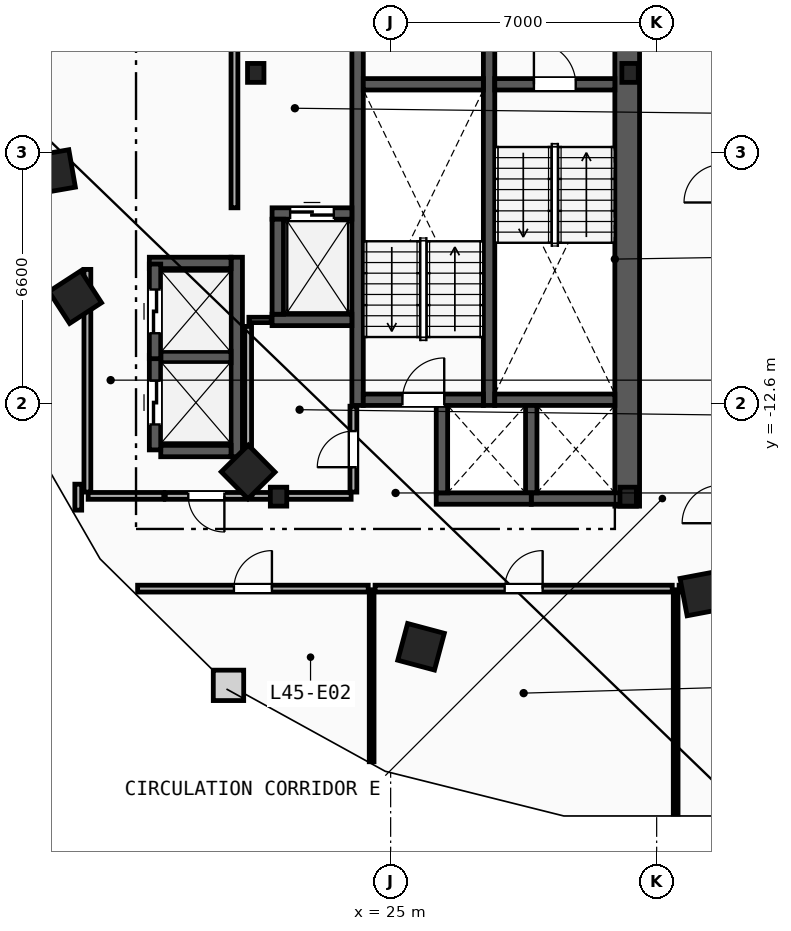
"""IFC4 building model, lengths in metres.
Left out: names, types, materials, properties, quantities, classifications, styles, units other than length and angle.
Written with IfcOpenShell. Run it as: python <this file> out.ifc"""

import sys

from ifc_helpers import new_model, si_unit, direction, frame, frame_2d, origin, origin_2d, place, context, subcontext, project, spatial, rectangle, i_section, extrude, element, fill, save


model = new_model("IFC4")
c1 = context("Model", 3, precision=1e-05, world=origin(), true_north=direction((0.0, 1.0)))
c2 = subcontext(c1, "Body", "Model", "MODEL_VIEW")
j1 = project(units=[si_unit("LENGTHUNIT", "METRE"), si_unit("PLANEANGLEUNIT", "RADIAN")], contexts=[c1])
p1 = place(None, origin())
s1 = spatial("IfcSite", under=j1, at=p1, CompositionType="ELEMENT")
p2 = place(p1, origin())
s2 = spatial("IfcBuilding", under=s1, at=p2, CompositionType="ELEMENT")
p3 = place(p2, frame((0.0, 0.0, 172.8)))
s3 = spatial("IfcBuildingStorey", under=s2, at=p3, CompositionType="ELEMENT", Elevation=172.8)
for number, where, z_axis, x_axis in (
    (1, (31.3, -3.9, 0.0), (0.0, 0.0, 1.0), (1.0, 0.0, 0.0)),
    (2, (21.45, -3.9, 0.0), (0.0, 0.0, 1.0), (1.0, 0.0, 0.0)),
    (3, (22.05, -15.05, 0.0), (0.0, 0.0, 1.0), (1.0, 0.0, 0.0)),
    (4, (31.25, -15.05, 0.0), (0.0, 0.0, 1.0), (1.0, 0.0, 0.0)),
):
    element("IfcColumn", number, at=place(p3, frame(where, z_axis=z_axis, x_axis=x_axis)), inside=s3, PredefinedType="COLUMN", context=c2, shape_type="SweptSolid", body=[
        extrude(i_section(OverallWidth=0.432, OverallDepth=0.498, WebThickness=0.056, FlangeThickness=0.089, FilletRadius=0.018, at=origin_2d()), origin(), (0.0, 0.0, 1.0), 3.6),
    ])
for number, where, z_axis, x_axis in (
    (5, (15.55, -3.2, 0.0), (0.0, 0.0, 1.0), (-0.315, -0.949, 0.0)),
    (6, (16.125, -6.5, 0.0), (0.0, 0.0, 1.0), (0.172, -0.985, 0.0)),
    (7, (16.7, -9.8, 0.0), (0.0, 0.0, 1.0), (0.544, -0.839, 0.0)),
    (8, (21.25, -14.4, 0.0), (0.0, 0.0, 1.0), (0.703, -0.711, 0.0)),
    (9, (25.8, -19.0, 0.0), (0.0, 0.0, 1.0), (0.966, -0.259, 0.0)),
    (10, (33.2, -17.6, 0.0), (0.0, 0.0, 1.0), (0.983, 0.186, 0.0)),
):
    element("IfcColumn", number, at=place(p3, frame(where, z_axis=z_axis, x_axis=x_axis)), inside=s3, PredefinedType="COLUMN", context=c2, shape_type="SweptSolid", body=[
        extrude(rectangle(XDim=1.0, YDim=1.0, at=origin_2d()), origin(), (0.0, 0.0, 1.0), 3.6),
    ])
p4 = place(p3, frame((31.225, -15.3, 0.0), z_axis=(0.0, 0.0, 1.0), x_axis=(0.0, 1.0, 0.0)))
e11 = element("IfcWall", 11, at=p4, inside=s3, PredefinedType="SHEAR", context=c2, shape_type="SweptSolid", body=[
    extrude(rectangle(XDim=13.33, YDim=0.65, at=frame_2d((6.665, 0.0))), origin(), (0.0, 0.0, 1.0), 3.36),
])
for number, where, z_axis, x_axis in (
    (12, (27.59, -12.65, 0.0), (0.0, 0.0, 1.0), (0.0, 1.0, 0.0)),
    (13, (24.13, -12.65, 0.0), (0.0, 0.0, 1.0), (0.0, 1.0, 0.0)),
):
    element("IfcWall", number, at=place(p3, frame(where, z_axis=z_axis, x_axis=x_axis)), inside=s3, PredefinedType="SHEAR", context=c2, shape_type="SweptSolid", body=[
        extrude(rectangle(XDim=10.68, YDim=0.3, at=frame_2d((5.34, 0.0))), origin(), (0.0, 0.0, 1.0), 3.36),
    ])
p5 = place(p3, frame((27.74, -4.2, 0.0), z_axis=(0.0, 0.0, 1.0), x_axis=(1.0, 0.0, 0.0)))
e14 = element("IfcWall", 14, at=p5, inside=s3, PredefinedType="SHEAR", context=c2, shape_type="SweptSolid", body=[
    extrude(rectangle(XDim=3.16, YDim=0.3, at=frame_2d((1.58, 0.0))), origin(), (0.0, 0.0, 1.0), 3.36),
])
p6 = place(p5, frame((1.03, 0.0, 0.0)))
e15 = element("IfcOpeningElement", 15, at=p6, cuts=e14, PredefinedType="OPENING", context=c2, shape_type="SweptSolid", body=[
    extrude(rectangle(XDim=1.1, YDim=2.15, at=frame_2d((0.55, 1.075))), frame((0.0, 0.16, 0.0), z_axis=(0.0, -1.0, 0.0), x_axis=(1.0, 0.0, 0.0)), (0.0, 0.0, 1.0), 0.32),
])
p7 = place(p3, frame((27.74, -12.5, 0.0), z_axis=(0.0, 0.0, 1.0), x_axis=(1.0, 0.0, 0.0)))
e16 = element("IfcWall", 16, at=p7, inside=s3, PredefinedType="SHEAR", context=c2, shape_type="SweptSolid", body=[
    extrude(rectangle(XDim=3.16, YDim=0.3, at=frame_2d((1.58, 0.0))), origin(), (0.0, 0.0, 1.0), 3.36),
])
p8 = place(p3, frame((24.28, -12.5, 0.0), z_axis=(0.0, 0.0, 1.0), x_axis=(1.0, 0.0, 0.0)))
e17 = element("IfcWall", 17, at=p8, inside=s3, PredefinedType="SHEAR", context=c2, shape_type="SweptSolid", body=[
    extrude(rectangle(XDim=3.16, YDim=0.3, at=frame_2d((1.58, 0.0))), origin(), (0.0, 0.0, 1.0), 3.36),
])
p9 = place(p8, frame((1.03, 0.0, 0.0)))
e18 = element("IfcOpeningElement", 18, at=p9, cuts=e17, PredefinedType="OPENING", context=c2, shape_type="SweptSolid", body=[
    extrude(rectangle(XDim=1.1, YDim=2.15, at=frame_2d((0.55, 1.075))), frame((0.0, 0.16, 0.0), z_axis=(0.0, -1.0, 0.0), x_axis=(1.0, 0.0, 0.0)), (0.0, 0.0, 1.0), 0.32),
])
p10 = place(p3, frame((24.28, -4.2, 0.0), z_axis=(0.0, 0.0, 1.0), x_axis=(1.0, 0.0, 0.0)))
e19 = element("IfcWall", 19, at=p10, inside=s3, PredefinedType="SHEAR", context=c2, shape_type="SweptSolid", body=[
    extrude(rectangle(XDim=3.16, YDim=0.3, at=frame_2d((1.58, 0.0))), origin(), (0.0, 0.0, 1.0), 3.36),
])
p11 = place(p3, frame((20.89, -7.45, 0.0), z_axis=(0.0, 0.0, 1.0), x_axis=(0.0, 1.0, 0.0)))
e20 = element("IfcWall", 20, at=p11, inside=s3, PredefinedType="PARTITIONING", context=c2, shape_type="SweptSolid", body=[
    extrude(rectangle(XDim=5.3, YDim=0.18, at=frame_2d((2.65, 0.0))), origin(), (0.0, 0.0, 1.0), 3.36),
])
p12 = place(p3, frame((21.88, -7.6, 0.0), z_axis=(0.0, 0.0, 1.0), x_axis=(1.0, 0.0, 0.0)))
e21 = element("IfcWall", 21, at=p12, inside=s3, PredefinedType="SHEAR", context=c2, shape_type="SweptSolid", body=[
    extrude(rectangle(XDim=2.1, YDim=0.3, at=frame_2d((1.05, 0.0))), origin(), (0.0, 0.0, 1.0), 3.36),
])
p13 = place(p12, frame((0.475, 0.0, 0.0)))
e22 = element("IfcOpeningElement", 22, at=p13, cuts=e21, PredefinedType="OPENING", context=c2, shape_type="SweptSolid", body=[
    extrude(rectangle(XDim=1.15, YDim=2.2, at=frame_2d((0.575, 1.1))), frame((0.0, 0.16, 0.0), z_axis=(0.0, -1.0, 0.0), x_axis=(1.0, 0.0, 0.0)), (0.0, 0.0, 1.0), 0.32),
])
p14 = place(p3, frame((21.88, -10.4, 0.0), z_axis=(0.0, 0.0, 1.0), x_axis=(1.0, 0.0, 0.0)))
e23 = element("IfcWall", 23, at=p14, inside=s3, PredefinedType="SHEAR", context=c2, shape_type="SweptSolid", body=[
    extrude(rectangle(XDim=2.1, YDim=0.3, at=frame_2d((1.05, 0.0))), origin(), (0.0, 0.0, 1.0), 3.36),
])
for number, where, z_axis, x_axis in (
    (24, (22.03, -10.25, 0.0), (0.0, 0.0, 1.0), (0.0, 1.0, 0.0)),
    (25, (28.7, -15.1, 0.0), (0.0, 0.0, 1.0), (1.0, 0.0, 0.0)),
):
    element("IfcWall", number, at=place(p3, frame(where, z_axis=z_axis, x_axis=x_axis)), inside=s3, PredefinedType="SHEAR", context=c2, shape_type="SweptSolid", body=[
        extrude(rectangle(XDim=2.5, YDim=0.3, at=frame_2d((1.25, 0.0))), origin(), (0.0, 0.0, 1.0), 3.36),
    ])
p15 = place(p3, frame((28.7, -14.95, 0.0), z_axis=(0.0, 0.0, 1.0), x_axis=(0.0, 1.0, 0.0)))
e26 = element("IfcWall", 26, at=p15, inside=s3, PredefinedType="SHEAR", context=c2, shape_type="SweptSolid", body=[
    extrude(rectangle(XDim=2.3, YDim=0.3, at=frame_2d((1.15, 0.0))), origin(), (0.0, 0.0, 1.0), 3.36),
])
p16 = place(p3, frame((26.2, -15.1, 0.0), z_axis=(0.0, 0.0, 1.0), x_axis=(1.0, 0.0, 0.0)))
e27 = element("IfcWall", 27, at=p16, inside=s3, PredefinedType="SHEAR", context=c2, shape_type="SweptSolid", body=[
    extrude(rectangle(XDim=2.5, YDim=0.3, at=frame_2d((1.25, 0.0))), origin(), (0.0, 0.0, 1.0), 3.36),
])
p17 = place(p3, frame((26.35, -14.95, 0.0), z_axis=(0.0, 0.0, 1.0), x_axis=(0.0, 1.0, 0.0)))
e28 = element("IfcWall", 28, at=p17, inside=s3, PredefinedType="SHEAR", context=c2, shape_type="SweptSolid", body=[
    extrude(rectangle(XDim=2.3, YDim=0.3, at=frame_2d((1.15, 0.0))), origin(), (0.0, 0.0, 1.0), 3.36),
])
p18 = place(p3, frame((20.95, -14.0, 0.0), z_axis=(0.0, 0.0, 1.0), x_axis=(0.0, 1.0, 0.0)))
e29 = element("IfcWall", 29, at=p18, inside=s3, PredefinedType="SHEAR", context=c2, shape_type="SweptSolid", body=[
    extrude(rectangle(XDim=5.25, YDim=0.3, at=frame_2d((2.625, 0.0))), origin(), (0.0, 0.0, 1.0), 3.36),
])
p19 = place(p3, frame((18.95, -13.85, 0.0), z_axis=(0.0, 0.0, 1.0), x_axis=(1.0, 0.0, 0.0)))
e30 = element("IfcWall", 30, at=p19, inside=s3, PredefinedType="SHEAR", context=c2, shape_type="SweptSolid", body=[
    extrude(rectangle(XDim=1.85, YDim=0.3, at=frame_2d((0.925, 0.0))), origin(), (0.0, 0.0, 1.0), 3.36),
])
p20 = place(p3, frame((18.65, -8.9, 0.0), z_axis=(0.0, 0.0, 1.0), x_axis=(1.0, 0.0, 0.0)))
e31 = element("IfcWall", 31, at=p20, inside=s3, PredefinedType="SHEAR", context=c2, shape_type="SweptSolid", body=[
    extrude(rectangle(XDim=2.15, YDim=0.3, at=frame_2d((1.075, 0.0))), origin(), (0.0, 0.0, 1.0), 3.36),
])
p21 = place(p3, frame((18.95, -11.375, 0.0), z_axis=(0.0, 0.0, 1.0), x_axis=(1.0, 0.0, 0.0)))
e32 = element("IfcWall", 32, at=p21, inside=s3, PredefinedType="SHEAR", context=c2, shape_type="SweptSolid", body=[
    extrude(rectangle(XDim=1.85, YDim=0.3, at=frame_2d((0.925, 0.0))), origin(), (0.0, 0.0, 1.0), 3.36),
])
p22 = place(p3, frame((18.8, -13.82, 0.0), z_axis=(0.0, 0.0, 1.0), x_axis=(0.0, 1.0, 0.0)))
e33 = element("IfcWall", 33, at=p22, inside=s3, PredefinedType="SHEAR", context=c2, shape_type="SweptSolid", body=[
    extrude(rectangle(XDim=2.49, YDim=0.3, at=frame_2d((1.245, 0.0))), origin(), (0.0, 0.0, 1.0), 3.36),
])
p23 = place(p22, frame((0.67, 0.0, 0.0)))
e34 = element("IfcOpeningElement", 34, at=p23, cuts=e33, PredefinedType="OPENING", context=c2, shape_type="SweptSolid", body=[
    extrude(rectangle(XDim=1.15, YDim=2.2, at=frame_2d((0.575, 1.1))), frame((0.0, 0.16, 0.0), z_axis=(0.0, -1.0, 0.0), x_axis=(1.0, 0.0, 0.0)), (0.0, 0.0, 1.0), 0.32),
])
p24 = place(p3, frame((18.8, -11.42, 0.0), z_axis=(0.0, 0.0, 1.0), x_axis=(0.0, 1.0, 0.0)))
e35 = element("IfcWall", 35, at=p24, inside=s3, PredefinedType="SHEAR", context=c2, shape_type="SweptSolid", body=[
    extrude(rectangle(XDim=2.49, YDim=0.3, at=frame_2d((1.245, 0.0))), origin(), (0.0, 0.0, 1.0), 3.36),
])
p25 = place(p24, frame((0.67, 0.0, 0.0)))
e36 = element("IfcOpeningElement", 36, at=p25, cuts=e35, PredefinedType="OPENING", context=c2, shape_type="SweptSolid", body=[
    extrude(rectangle(XDim=1.15, YDim=2.2, at=frame_2d((0.575, 1.1))), frame((0.0, 0.16, 0.0), z_axis=(0.0, -1.0, 0.0), x_axis=(1.0, 0.0, 0.0)), (0.0, 0.0, 1.0), 0.32),
])
p26 = place(p3, frame((17.02, -14.93, 0.0), z_axis=(0.0, 0.0, 1.0), x_axis=(0.0, 1.0, 0.0)))
e37 = element("IfcWall", 37, at=p26, inside=s3, PredefinedType="PARTITIONING", context=c2, shape_type="SweptSolid", body=[
    extrude(rectangle(XDim=5.86, YDim=0.18, at=frame_2d((2.93, 0.0))), origin(), (0.0, 0.0, 1.0), 3.36),
])
p27 = place(p3, frame((17.04, -15.03, 0.0), z_axis=(0.0, 0.0, 1.0), x_axis=(1.0, 0.0, 0.0)))
e38 = element("IfcWall", 38, at=p27, inside=s3, PredefinedType="PARTITIONING", context=c2, shape_type="SweptSolid", body=[
    extrude(rectangle(XDim=1.99, YDim=0.18, at=frame_2d((0.995, 0.0))), origin(), (0.0, 0.0, 1.0), 3.36),
])
p28 = place(p3, frame((21.23, -15.03, 0.0), z_axis=(0.0, 0.0, 1.0), x_axis=(-1.0, 0.0, 0.0)))
e39 = element("IfcWall", 39, at=p28, inside=s3, PredefinedType="PARTITIONING", context=c2, shape_type="SweptSolid", body=[
    extrude(rectangle(XDim=2.16, YDim=0.18, at=frame_2d((1.08, 0.0))), origin(), (0.0, 0.0, 1.0), 3.36),
])
p29 = place(p28, frame((0.605, 0.0, 0.0)))
e40 = element("IfcOpeningElement", 40, at=p29, cuts=e39, PredefinedType="OPENING", context=c2, shape_type="SweptSolid", body=[
    extrude(rectangle(XDim=0.95, YDim=2.1, at=frame_2d((0.475, 1.05))), frame((0.0, 0.1, 0.0), z_axis=(0.0, -1.0, 0.0), x_axis=(1.0, 0.0, 0.0)), (0.0, 0.0, 1.0), 0.2),
])
p30 = place(p3, frame((21.27, -10.4, 0.0), z_axis=(0.0, 0.0, 1.0), x_axis=(1.0, 0.0, 0.0)))
e41 = element("IfcWall", 41, at=p30, inside=s3, PredefinedType="PARTITIONING", context=c2, shape_type="SweptSolid", body=[
    extrude(rectangle(XDim=0.59, YDim=0.14, at=frame_2d((0.295, 0.0))), origin(), (0.0, 0.0, 1.0), 3.36),
])
p31 = place(p3, frame((21.25, -14.93, 0.0), z_axis=(0.0, 0.0, 1.0), x_axis=(0.0, 1.0, 0.0)))
e42 = element("IfcWall", 42, at=p31, inside=s3, PredefinedType="PARTITIONING", context=c2, shape_type="SweptSolid", body=[
    extrude(rectangle(XDim=4.36, YDim=0.18, at=frame_2d((2.18, 0.0))), origin(), (0.0, 0.0, 1.0), 3.36),
])
p32 = place(p3, frame((21.35, -15.03, 0.0), z_axis=(0.0, 0.0, 1.0), x_axis=(1.0, 0.0, 0.0)))
e43 = element("IfcWall", 43, at=p32, inside=s3, PredefinedType="PARTITIONING", context=c2, shape_type="SweptSolid", body=[
    extrude(rectangle(XDim=2.61, YDim=0.18, at=frame_2d((1.305, 0.0))), origin(), (0.0, 0.0, 1.0), 2.433),
])
p33 = place(p3, frame((24.02, -14.93, 0.0), z_axis=(0.0, 0.0, 1.0), x_axis=(0.0, 1.0, 0.0)))
e44 = element("IfcWall", 44, at=p33, inside=s3, PredefinedType="PARTITIONING", context=c2, shape_type="SweptSolid", body=[
    extrude(rectangle(XDim=2.26, YDim=0.18, at=frame_2d((1.13, 0.0))), origin(), (0.0, 0.0, 1.0), 3.36),
])
p34 = place(p33, frame((0.655, 0.0, 0.0)))
e45 = element("IfcOpeningElement", 45, at=p34, cuts=e44, PredefinedType="OPENING", context=c2, shape_type="SweptSolid", body=[
    extrude(rectangle(XDim=0.95, YDim=2.1, at=frame_2d((0.475, 1.05))), frame((0.0, 0.1, 0.0), z_axis=(0.0, -1.0, 0.0), x_axis=(1.0, 0.0, 0.0)), (0.0, 0.0, 1.0), 0.2),
])
p35 = place(p3, frame((24.5, -22.025, 0.0), z_axis=(0.0, 0.0, 1.0), x_axis=(0.0, 1.0, 0.0)))
e46 = element("IfcWall", 46, at=p35, inside=s3, PredefinedType="PARTITIONING", context=c2, shape_type="SweptSolid", body=[
    extrude(rectangle(XDim=4.525, YDim=0.125, at=frame_2d((2.263, 0.0))), origin(), (0.0, 0.0, 1.0), 3.36),
])
p36 = place(p3, frame((32.5, -23.402, 0.0), z_axis=(0.0, 0.0, 1.0), x_axis=(0.0, 1.0, 0.0)))
e47 = element("IfcWall", 47, at=p36, inside=s3, PredefinedType="PARTITIONING", context=c2, shape_type="SweptSolid", body=[
    extrude(rectangle(XDim=5.902, YDim=0.125, at=frame_2d((2.951, 0.0))), origin(), (0.0, 0.0, 1.0), 3.36),
])
p37 = place(p3, frame((24.59, -17.47, 0.0), z_axis=(0.0, 0.0, 1.0), x_axis=(1.0, 0.0, 0.0)))
e48 = element("IfcWall", 48, at=p37, inside=s3, PredefinedType="PARTITIONING", context=c2, shape_type="SweptSolid", body=[
    extrude(rectangle(XDim=7.82, YDim=0.18, at=frame_2d((3.91, 0.0))), origin(), (0.0, 0.0, 1.0), 3.36),
])
p38 = place(p37, frame((3.41, 0.0, 0.0)))
e49 = element("IfcOpeningElement", 49, at=p38, cuts=e48, PredefinedType="OPENING", context=c2, shape_type="SweptSolid", body=[
    extrude(rectangle(XDim=1.0, YDim=2.15, at=frame_2d((0.5, 1.075))), frame((0.0, 0.1, 0.0), z_axis=(0.0, -1.0, 0.0), x_axis=(1.0, 0.0, 0.0)), (0.0, 0.0, 1.0), 0.2),
])
p39 = place(p3, frame((18.342, -17.47, 0.0), z_axis=(0.0, 0.0, 1.0), x_axis=(1.0, 0.0, 0.0)))
e50 = element("IfcWall", 50, at=p39, inside=s3, PredefinedType="PARTITIONING", context=c2, shape_type="SweptSolid", body=[
    extrude(rectangle(XDim=6.068, YDim=0.18, at=frame_2d((3.034, 0.0))), origin(), (0.0, 0.0, 1.0), 3.36),
])
p40 = place(p39, frame((2.534, 0.0, 0.0)))
e51 = element("IfcOpeningElement", 51, at=p40, cuts=e50, PredefinedType="OPENING", context=c2, shape_type="SweptSolid", body=[
    extrude(rectangle(XDim=1.0, YDim=2.15, at=frame_2d((0.5, 1.075))), frame((0.0, 0.1, 0.0), z_axis=(0.0, -1.0, 0.0), x_axis=(1.0, 0.0, 0.0)), (0.0, 0.0, 1.0), 0.2),
])
p41 = place(p3, frame((32.59, -17.47, 0.0), z_axis=(0.0, 0.0, 1.0), x_axis=(1.0, 0.0, 0.0)))
e52 = element("IfcWall", 52, at=p41, inside=s3, PredefinedType="PARTITIONING", context=c2, shape_type="SweptSolid", body=[
    extrude(rectangle(XDim=1.038, YDim=0.18, at=frame_2d((0.519, 0.0))), origin(), (0.0, 0.0, 1.0), 3.36),
])
p42 = place(p3, frame((16.78, -14.721, 0.0), z_axis=(0.0, 0.0, 1.0), x_axis=(0.0, -1.0, 0.0)))
e53 = element("IfcWall", 53, at=p42, inside=s3, PredefinedType="PARTITIONING", context=c2, shape_type="SweptSolid", body=[
    extrude(rectangle(XDim=0.684, YDim=0.18, at=frame_2d((0.342, 0.0))), origin(), (0.0, 0.0, 1.0), 3.36),
])
p43 = place(p6, origin())
e54 = element("IfcDoor", 54, at=p43, inside=s3, OperationType="SINGLE_SWING_LEFT", PredefinedType="DOOR", context=c2, shape_type="SweptSolid", body=[
    extrude(rectangle(XDim=1.1, YDim=2.15, at=frame_2d((0.55, 1.075))), frame((0.0, 0.025, 0.0), z_axis=(0.0, -1.0, 0.0), x_axis=(1.0, 0.0, 0.0)), (0.0, 0.0, 1.0), 0.05),
])
fill(e15, e54)
p44 = place(p9, origin())
e55 = element("IfcDoor", 55, at=p44, inside=s3, OperationType="SINGLE_SWING_RIGHT", PredefinedType="DOOR", context=c2, shape_type="SweptSolid", body=[
    extrude(rectangle(XDim=1.1, YDim=2.15, at=frame_2d((0.55, 1.075))), frame((0.0, 0.025, 0.0), z_axis=(0.0, -1.0, 0.0), x_axis=(1.0, 0.0, 0.0)), (0.0, 0.0, 1.0), 0.05),
])
fill(e18, e55)
p45 = place(p13, origin())
e56 = element("IfcDoor", 56, at=p45, inside=s3, OperationType="SLIDING_TO_LEFT", PredefinedType="TRAPDOOR", context=c2, shape_type="SweptSolid", body=[
    extrude(rectangle(XDim=1.15, YDim=2.2, at=frame_2d((0.575, 1.1))), frame((0.0, 0.025, 0.0), z_axis=(0.0, -1.0, 0.0), x_axis=(1.0, 0.0, 0.0)), (0.0, 0.0, 1.0), 0.05),
])
fill(e22, e56)
p46 = place(p23, origin())
e57 = element("IfcDoor", 57, at=p46, inside=s3, OperationType="SLIDING_TO_LEFT", PredefinedType="TRAPDOOR", context=c2, shape_type="SweptSolid", body=[
    extrude(rectangle(XDim=1.15, YDim=2.2, at=frame_2d((0.575, 1.1))), frame((0.0, 0.025, 0.0), z_axis=(0.0, -1.0, 0.0), x_axis=(1.0, 0.0, 0.0)), (0.0, 0.0, 1.0), 0.05),
])
fill(e34, e57)
p47 = place(p25, origin())
e58 = element("IfcDoor", 58, at=p47, inside=s3, OperationType="SLIDING_TO_LEFT", PredefinedType="TRAPDOOR", context=c2, shape_type="SweptSolid", body=[
    extrude(rectangle(XDim=1.15, YDim=2.2, at=frame_2d((0.575, 1.1))), frame((0.0, 0.025, 0.0), z_axis=(0.0, -1.0, 0.0), x_axis=(1.0, 0.0, 0.0)), (0.0, 0.0, 1.0), 0.05),
])
fill(e36, e58)
p48 = place(p38, origin())
e59 = element("IfcDoor", 59, at=p48, inside=s3, OperationType="SINGLE_SWING_RIGHT", PredefinedType="DOOR", context=c2, shape_type="SweptSolid", body=[
    extrude(rectangle(XDim=1.0, YDim=2.15, at=frame_2d((0.5, 1.075))), frame((0.0, 0.025, 0.0), z_axis=(0.0, -1.0, 0.0), x_axis=(1.0, 0.0, 0.0)), (0.0, 0.0, 1.0), 0.05),
])
fill(e49, e59)
p49 = place(p40, origin())
e60 = element("IfcDoor", 60, at=p49, inside=s3, OperationType="SINGLE_SWING_RIGHT", PredefinedType="DOOR", context=c2, shape_type="SweptSolid", body=[
    extrude(rectangle(XDim=1.0, YDim=2.15, at=frame_2d((0.5, 1.075))), frame((0.0, 0.025, 0.0), z_axis=(0.0, -1.0, 0.0), x_axis=(1.0, 0.0, 0.0)), (0.0, 0.0, 1.0), 0.05),
])
fill(e51, e60)
p50 = place(p34, origin())
e61 = element("IfcDoor", 61, at=p50, inside=s3, OperationType="SINGLE_SWING_LEFT", PredefinedType="DOOR", context=c2, shape_type="SweptSolid", body=[
    extrude(rectangle(XDim=0.95, YDim=2.1, at=frame_2d((0.475, 1.05))), frame((0.0, 0.025, 0.0), z_axis=(0.0, -1.0, 0.0), x_axis=(1.0, 0.0, 0.0)), (0.0, 0.0, 1.0), 0.05),
])
fill(e45, e61)
p51 = place(p29, origin())
e62 = element("IfcDoor", 62, at=p51, inside=s3, OperationType="SINGLE_SWING_LEFT", PredefinedType="DOOR", context=c2, shape_type="SweptSolid", body=[
    extrude(rectangle(XDim=0.95, YDim=2.1, at=frame_2d((0.475, 1.05))), frame((0.0, 0.025, 0.0), z_axis=(0.0, -1.0, 0.0), x_axis=(1.0, 0.0, 0.0)), (0.0, 0.0, 1.0), 0.05),
])
fill(e40, e62)
save(model, sys.argv[1])
